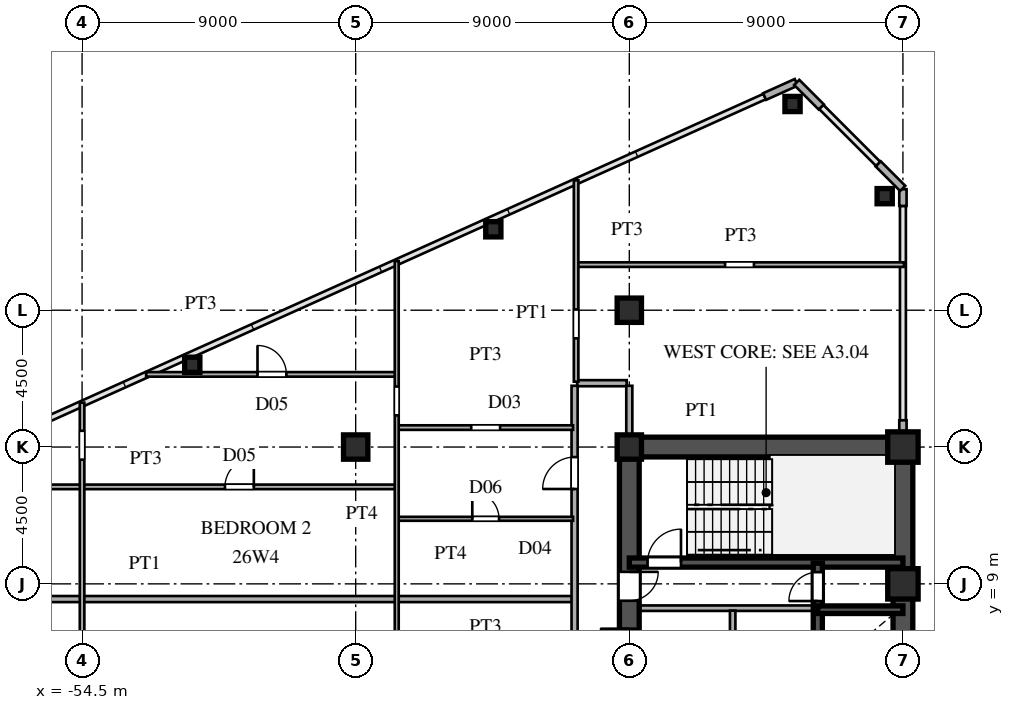
"""IFC4 building model, lengths in metres.
Left out: names, types, materials, properties, quantities, classifications, styles, units other than length and angle.
Written with IfcOpenShell. Run it as: python <this file> out.ifc"""

import sys

from ifc_helpers import new_model, si_unit, direction, frame, frame_2d, origin, origin_2d, place, context, subcontext, project, spatial, rectangle, hollow_rectangle, i_section, extrude, source, transform, mapped, element, fill, save


model = new_model("IFC4")
c1 = context("Model", 3, precision=1e-05, world=origin(), true_north=direction((0.0, 1.0)))
c2 = subcontext(c1, "Body", "Model", "MODEL_VIEW")
j1 = project(units=[si_unit("LENGTHUNIT", "METRE"), si_unit("PLANEANGLEUNIT", "RADIAN")], contexts=[c1])
p1 = place(None, origin())
s1 = spatial("IfcSite", under=j1, at=p1, CompositionType="ELEMENT")
p2 = place(p1, origin())
s2 = spatial("IfcBuilding", under=s1, at=p2, CompositionType="ELEMENT")
p3 = place(p2, frame((0.0, 0.0, 99.6)))
s3 = spatial("IfcBuildingStorey", under=s2, at=p3, CompositionType="ELEMENT", Elevation=99.6)
m1 = source(origin(), c2, "Body", "SweptSolid", [
    extrude(hollow_rectangle(XDim=1.0, YDim=1.0, WallThickness=0.042, at=origin_2d()), origin(), (0.0, 0.0, 1.0), 3.6),
])
for number, where, z_axis, x_axis in (
    (1, (-27.5, 9.0, 0.0), (0.0, 0.0, 1.0), (1.0, 0.0, 0.0)),
    (2, (-27.5, 13.5, 0.0), (0.0, 0.0, 1.0), (1.0, 0.0, 0.0)),
):
    element("IfcColumn", number, at=place(p3, frame(where, z_axis=z_axis, x_axis=x_axis)), inside=s3, PredefinedType="COLUMN", context=c2, shape_type="MappedRepresentation", body=[
        mapped(m1, transform((0.0, 0.0, 0.0), scale=1.0)),
    ])
m2 = source(origin(), c2, "Body", "SweptSolid", [
    extrude(i_section(OverallWidth=0.8, OverallDepth=0.8, WebThickness=0.032, FlangeThickness=0.05, at=origin_2d()), origin(), (0.0, 0.0, 1.0), 3.6),
])
for number, where, z_axis, x_axis in (
    (3, (-36.5, 13.5, 0.0), (0.0, 0.0, 1.0), (1.0, 0.0, 0.0)),
    (4, (-36.5, 18.0, 0.0), (0.0, 0.0, 1.0), (1.0, 0.0, 0.0)),
    (5, (-45.5, 13.5, 0.0), (0.0, 0.0, 1.0), (1.0, 0.0, 0.0)),
):
    element("IfcColumn", number, at=place(p3, frame(where, z_axis=z_axis, x_axis=x_axis)), inside=s3, PredefinedType="COLUMN", context=c2, shape_type="MappedRepresentation", body=[
        mapped(m2, transform((0.0, 0.0, 0.0), scale=1.0)),
    ])
m3 = source(origin(), c2, "Body", "SweptSolid", [
    extrude(hollow_rectangle(XDim=0.5, YDim=0.5, WallThickness=0.02, at=origin_2d()), origin(), (0.0, 0.0, 1.0), 3.6),
])
for number, where, z_axis, x_axis in (
    (6, (-28.1, 21.751, 0.0), (0.0, 0.0, 1.0), (1.0, 0.0, 0.0)),
    (7, (-31.131, 24.783, 0.0), (0.0, 0.0, 1.0), (1.0, 0.0, 0.0)),
    (8, (-40.973, 20.661, 0.0), (0.0, 0.0, 1.0), (1.0, 0.0, 0.0)),
    (9, (-50.875, 16.205, 0.0), (0.0, 0.0, 1.0), (1.0, 0.0, 0.0)),
):
    element("IfcColumn", number, at=place(p3, frame(where, z_axis=z_axis, x_axis=x_axis)), inside=s3, PredefinedType="COLUMN", context=c2, shape_type="MappedRepresentation", body=[
        mapped(m3, transform((0.0, 0.0, 0.0), scale=1.0)),
    ])
p4 = place(p3, frame((-27.5, 13.83, 0.0), z_axis=(0.0, 0.0, 1.0), x_axis=(0.0, 1.0, 0.0)))
e10 = element("IfcWall", 10, at=p4, inside=s3, PredefinedType="SOLIDWALL", context=c2, shape_type="SweptSolid", body=[
    extrude(rectangle(XDim=0.55, YDim=0.24, at=frame_2d((0.275, 0.0))), origin(), (0.0, 0.0, 1.0), 2.88),
])
p5 = place(p3, frame((-27.5, 21.43, 0.0), z_axis=(0.0, 0.0, 1.0), x_axis=(0.0, 1.0, 0.0)))
e11 = element("IfcWall", 11, at=p5, inside=s3, PredefinedType="SOLIDWALL", context=c2, shape_type="SweptSolid", body=[
    extrude(rectangle(XDim=0.55, YDim=0.24, at=frame_2d((0.275, 0.0))), origin(), (0.0, 0.0, 1.0), 3.38),
])
for number, where, z_axis, x_axis in (
    (12, (-27.507, 22.007, 0.0), (0.0, 0.0, 1.0), (-0.707, 0.707, 0.0)),
    (13, (-30.187, 24.687, 0.0), (0.0, 0.0, 1.0), (-0.707, 0.707, 0.0)),
):
    element("IfcWall", number, at=place(p3, frame(where, z_axis=z_axis, x_axis=x_axis)), inside=s3, PredefinedType="SOLIDWALL", context=c2, shape_type="SweptSolid", body=[
        extrude(rectangle(XDim=1.14, YDim=0.24, at=frame_2d((0.57, 0.0))), origin(), (0.0, 0.0, 1.0), 3.38),
    ])
p6 = place(p3, frame((-31.009, 25.496, 0.0), z_axis=(0.0, 0.0, 1.0), x_axis=(-0.911929519623, -0.410346866979, 0.0)))
e14 = element("IfcWall", 14, at=p6, inside=s3, PredefinedType="SOLIDWALL", context=c2, shape_type="SweptSolid", body=[
    extrude(rectangle(XDim=1.14, YDim=0.24, at=frame_2d((0.57, 0.0))), origin(), (0.0, 0.0, 1.0), 3.38),
])
p7 = place(p3, frame((-27.5, 1.3, 0.0), z_axis=(0.0, 0.0, 1.0), x_axis=(0.0, 1.0, 0.0)))
e15 = element("IfcWall", 15, at=p7, inside=s3, PredefinedType="SHEAR", context=c2, shape_type="SweptSolid", body=[
    extrude(rectangle(XDim=12.2, YDim=0.65, at=frame_2d((6.1, 0.0))), origin(), (0.0, 0.0, 1.0), 3.38),
])
p8 = place(p3, frame((-36.5, 13.5, 0.0), z_axis=(0.0, 0.0, 1.0), x_axis=(1.0, 0.0, 0.0)))
e16 = element("IfcWall", 16, at=p8, inside=s3, PredefinedType="SHEAR", context=c2, shape_type="SweptSolid", body=[
    extrude(rectangle(XDim=9.0, YDim=0.65, at=frame_2d((4.5, 0.0))), origin(), (0.0, 0.0, 1.0), 3.38),
])
p9 = place(p3, frame((-36.5, 8.2, 0.0), z_axis=(0.0, 0.0, 1.0), x_axis=(0.0, 1.0, 0.0)))
e17 = element("IfcWall", 17, at=p9, inside=s3, PredefinedType="SHEAR", context=c2, shape_type="SweptSolid", body=[
    extrude(rectangle(XDim=5.45, YDim=0.65, at=frame_2d((2.725, 0.0))), origin(), (0.0, 0.0, 1.0), 3.38),
])
p10 = place(p9, frame((0.245, 0.0, 0.0)))
e18 = element("IfcOpeningElement", 18, at=p10, cuts=e17, PredefinedType="OPENING", context=c2, shape_type="SweptSolid", body=[
    extrude(rectangle(XDim=0.95, YDim=2.15, at=frame_2d((0.475, 1.075))), frame((0.0, 0.335, 0.0), z_axis=(0.0, -1.0, 0.0), x_axis=(1.0, 0.0, 0.0)), (0.0, 0.0, 1.0), 0.67),
])
p11 = place(p3, frame((-36.5, 5.9, 0.0), z_axis=(0.0, 0.0, 1.0), x_axis=(0.0, 1.0, 0.0)))
e19 = element("IfcWall", 19, at=p11, inside=s3, PredefinedType="SHEAR", context=c2, shape_type="SweptSolid", body=[
    extrude(rectangle(XDim=2.3, YDim=0.65, at=frame_2d((1.15, 0.0))), origin(), (0.0, 0.0, 1.0), 3.38),
])
p12 = place(p11, frame((0.675, 0.0, 0.0)))
e20 = element("IfcOpeningElement", 20, at=p12, cuts=e19, PredefinedType="OPENING", context=c2, shape_type="SweptSolid", body=[
    extrude(rectangle(XDim=0.95, YDim=2.15, at=frame_2d((0.475, 1.075))), frame((0.0, 0.335, 0.0), z_axis=(0.0, -1.0, 0.0), x_axis=(1.0, 0.0, 0.0)), (0.0, 0.0, 1.0), 0.67),
])
p13 = place(p3, frame((-36.5, 9.7, 0.0), z_axis=(0.0, 0.0, 1.0), x_axis=(1.0, 0.0, 0.0)))
e21 = element("IfcWall", 21, at=p13, inside=s3, PredefinedType="SHEAR", context=c2, shape_type="SweptSolid", body=[
    extrude(rectangle(XDim=9.0, YDim=0.3, at=frame_2d((4.5, 0.0))), origin(), (0.0, 0.0, 1.0), 3.38),
])
p14 = place(p13, frame((0.6, 0.0, 0.0)))
e22 = element("IfcOpeningElement", 22, at=p14, cuts=e21, PredefinedType="OPENING", context=c2, shape_type="SweptSolid", body=[
    extrude(rectangle(XDim=1.1, YDim=2.2, at=frame_2d((0.55, 1.1))), frame((0.0, 0.16, 0.0), z_axis=(0.0, -1.0, 0.0), x_axis=(1.0, 0.0, 0.0)), (0.0, 0.0, 1.0), 0.32),
])
p15 = place(p3, frame((-30.3, 8.15, 0.0), z_axis=(0.0, 0.0, 1.0), x_axis=(1.0, 0.0, 0.0)))
e23 = element("IfcWall", 23, at=p15, inside=s3, PredefinedType="SHEAR", context=c2, shape_type="SweptSolid", body=[
    extrude(rectangle(XDim=2.8, YDim=0.25, at=frame_2d((1.4, 0.0))), origin(), (0.0, 0.0, 1.0), 3.38),
])
p16 = place(p3, frame((-30.3, 5.9, 0.0), z_axis=(0.0, 0.0, 1.0), x_axis=(0.0, 1.0, 0.0)))
e24 = element("IfcWall", 24, at=p16, inside=s3, PredefinedType="SHEAR", context=c2, shape_type="SweptSolid", body=[
    extrude(rectangle(XDim=2.25, YDim=0.3, at=frame_2d((1.125, 0.0))), origin(), (0.0, 0.0, 1.0), 3.38),
])
p17 = place(p3, frame((-30.3, 8.15, 0.0), z_axis=(0.0, 0.0, 1.0), x_axis=(0.0, 1.0, 0.0)))
e25 = element("IfcWall", 25, at=p17, inside=s3, PredefinedType="SHEAR", context=c2, shape_type="SweptSolid", body=[
    extrude(rectangle(XDim=1.53, YDim=0.3, at=frame_2d((0.765, 0.0))), origin(), (0.0, 0.0, 1.0), 3.38),
])
p18 = place(p17, frame((0.285, 0.0, 0.0)))
e26 = element("IfcOpeningElement", 26, at=p18, cuts=e25, PredefinedType="OPENING", context=c2, shape_type="SweptSolid", body=[
    extrude(rectangle(XDim=0.95, YDim=2.15, at=frame_2d((0.475, 1.075))), frame((0.0, 0.16, 0.0), z_axis=(0.0, -1.0, 0.0), x_axis=(1.0, 0.0, 0.0)), (0.0, 0.0, 1.0), 0.32),
])
p19 = place(p3, frame((-36.15, 8.2, 0.0), z_axis=(0.0, 0.0, 1.0), x_axis=(1.0, 0.0, 0.0)))
e27 = element("IfcWall", 27, at=p19, inside=s3, PredefinedType="PARTITIONING", context=c2, shape_type="SweptSolid", body=[
    extrude(rectangle(XDim=5.7, YDim=0.18, at=frame_2d((2.85, 0.0))), origin(), (0.0, 0.0, 1.0), 3.38),
])
p20 = place(p3, frame((-33.1, 1.38, 0.0), z_axis=(0.0, 0.0, 1.0), x_axis=(0.0, 1.0, 0.0)))
e28 = element("IfcWall", 28, at=p20, inside=s3, PredefinedType="PARTITIONING", context=c2, shape_type="SweptSolid", body=[
    extrude(rectangle(XDim=6.74, YDim=0.18, at=frame_2d((3.37, 0.0))), origin(), (0.0, 0.0, 1.0), 3.38),
])
p21 = place(p3, frame((-68.79, 8.5, 0.0), z_axis=(0.0, 0.0, 1.0), x_axis=(1.0, 0.0, 0.0)))
e29 = element("IfcWall", 29, at=p21, inside=s3, PredefinedType="PARTITIONING", context=c2, shape_type="SweptSolid", body=[
    extrude(rectangle(XDim=30.41, YDim=0.2, at=frame_2d((15.205, 0.0))), origin(), (0.0, 0.0, 1.0), 3.38),
])
p22 = place(p3, frame((-44.1, 11.14, 0.0), z_axis=(0.0, 0.0, 1.0), x_axis=(1.0, 0.0, 0.0)))
e30 = element("IfcWall", 30, at=p22, inside=s3, PredefinedType="PARTITIONING", context=c2, shape_type="SweptSolid", body=[
    extrude(rectangle(XDim=5.75, YDim=0.13, at=frame_2d((2.875, 0.0))), origin(), (0.0, 0.0, 1.0), 3.38),
])
p23 = place(p22, frame((2.435, 0.0, 0.0)))
e31 = element("IfcOpeningElement", 31, at=p23, cuts=e30, PredefinedType="OPENING", context=c2, shape_type="SweptSolid", body=[
    extrude(rectangle(XDim=0.88, YDim=2.1, at=frame_2d((0.44, 1.05))), frame((0.0, 0.075, 0.0), z_axis=(0.0, -1.0, 0.0), x_axis=(1.0, 0.0, 0.0)), (0.0, 0.0, 1.0), 0.15),
])
p24 = place(p3, frame((-60.603, 12.19, 0.0), z_axis=(0.0, 0.0, 1.0), x_axis=(1.0, 0.0, 0.0)))
e32 = element("IfcWall", 32, at=p24, inside=s3, PredefinedType="PARTITIONING", context=c2, shape_type="SweptSolid", body=[
    extrude(rectangle(XDim=16.403, YDim=0.15, at=frame_2d((8.202, 0.0))), origin(), (0.0, 0.0, 1.0), 3.38),
])
p25 = place(p24, frame((10.803, 0.0, 0.0)))
e33 = element("IfcOpeningElement", 33, at=p25, cuts=e32, PredefinedType="OPENING", context=c2, shape_type="SweptSolid", body=[
    extrude(rectangle(XDim=0.95, YDim=2.15, at=frame_2d((0.475, 1.075))), frame((0.0, 0.085, 0.0), z_axis=(0.0, -1.0, 0.0), x_axis=(1.0, 0.0, 0.0)), (0.0, 0.0, 1.0), 0.17),
])
p26 = place(p24, frame((2.594, 0.0, 0.0)))
e34 = element("IfcOpeningElement", 34, at=p26, cuts=e32, PredefinedType="OPENING", context=c2, shape_type="SweptSolid", body=[
    extrude(rectangle(XDim=0.95, YDim=2.15, at=frame_2d((0.475, 1.075))), frame((0.0, 0.085, 0.0), z_axis=(0.0, -1.0, 0.0), x_axis=(1.0, 0.0, 0.0)), (0.0, 0.0, 1.0), 0.17),
])
p27 = place(p3, frame((-44.1, 14.14, 0.0), z_axis=(0.0, 0.0, 1.0), x_axis=(1.0, 0.0, 0.0)))
e35 = element("IfcWall", 35, at=p27, inside=s3, PredefinedType="PARTITIONING", context=c2, shape_type="SweptSolid", body=[
    extrude(rectangle(XDim=5.75, YDim=0.15, at=frame_2d((2.875, 0.0))), origin(), (0.0, 0.0, 1.0), 3.38),
])
p28 = place(p27, frame((2.4, 0.0, 0.0)))
e36 = element("IfcOpeningElement", 36, at=p28, cuts=e35, PredefinedType="OPENING", context=c2, shape_type="SweptSolid", body=[
    extrude(rectangle(XDim=0.95, YDim=2.15, at=frame_2d((0.475, 1.075))), frame((0.0, 0.085, 0.0), z_axis=(0.0, -1.0, 0.0), x_axis=(1.0, 0.0, 0.0)), (0.0, 0.0, 1.0), 0.17),
])
p29 = place(p3, frame((-38.215, 15.6, 0.0), z_axis=(0.0, 0.0, 1.0), x_axis=(1.0, 0.0, 0.0)))
e37 = element("IfcWall", 37, at=p29, inside=s3, PredefinedType="PARTITIONING", context=c2, shape_type="SweptSolid", body=[
    extrude(rectangle(XDim=1.63, YDim=0.2, at=frame_2d((0.815, 0.0))), origin(), (0.0, 0.0, 1.0), 3.38),
])
p30 = place(p3, frame((-52.394, 15.89, 0.0), z_axis=(0.0, 0.0, 1.0), x_axis=(1.0, 0.0, 0.0)))
e38 = element("IfcWall", 38, at=p30, inside=s3, PredefinedType="PARTITIONING", context=c2, shape_type="SweptSolid", body=[
    extrude(rectangle(XDim=8.194, YDim=0.15, at=frame_2d((4.097, 0.0))), origin(), (0.0, 0.0, 1.0), 3.38),
])
p31 = place(p30, frame((3.664, 0.0, 0.0)))
e39 = element("IfcOpeningElement", 39, at=p31, cuts=e38, PredefinedType="OPENING", context=c2, shape_type="SweptSolid", body=[
    extrude(rectangle(XDim=0.95, YDim=2.15, at=frame_2d((0.475, 1.075))), frame((0.0, 0.085, 0.0), z_axis=(0.0, -1.0, 0.0), x_axis=(1.0, 0.0, 0.0)), (0.0, 0.0, 1.0), 0.17),
])
p32 = place(p3, frame((-38.2, 19.5, 0.0), z_axis=(0.0, 0.0, 1.0), x_axis=(1.0, 0.0, 0.0)))
e40 = element("IfcWall", 40, at=p32, inside=s3, PredefinedType="PARTITIONING", context=c2, shape_type="SweptSolid", body=[
    extrude(rectangle(XDim=10.735, YDim=0.15, at=frame_2d((5.367, 0.0))), origin(), (0.0, 0.0, 1.0), 3.38),
])
p33 = place(p32, frame((4.85, 0.0, 0.0)))
e41 = element("IfcOpeningElement", 41, at=p33, cuts=e40, PredefinedType="OPENING", context=c2, shape_type="SweptSolid", body=[
    extrude(rectangle(XDim=0.95, YDim=2.15, at=frame_2d((0.475, 1.075))), frame((0.0, 0.085, 0.0), z_axis=(0.0, -1.0, 0.0), x_axis=(1.0, 0.0, 0.0)), (0.0, 0.0, 1.0), 0.17),
])
p34 = place(p3, frame((-54.5, -12.75, 0.0), z_axis=(0.0, 0.0, 1.0), x_axis=(0.0, 1.0, 0.0)))
e42 = element("IfcWall", 42, at=p34, inside=s3, PredefinedType="PARTITIONING", context=c2, shape_type="SweptSolid", body=[
    extrude(rectangle(XDim=27.71, YDim=0.15, at=frame_2d((13.855, 0.0))), origin(), (0.0, 0.0, 1.0), 2.68),
])
p35 = place(p34, frame((4.625, 0.0, 0.0)))
e43 = element("IfcOpeningElement", 43, at=p35, cuts=e42, PredefinedType="OPENING", context=c2, shape_type="SweptSolid", body=[
    extrude(rectangle(XDim=0.95, YDim=2.15, at=frame_2d((0.475, 1.075))), frame((0.0, 0.085, 0.0), z_axis=(0.0, -1.0, 0.0), x_axis=(1.0, 0.0, 0.0)), (0.0, 0.0, 1.0), 0.17),
])
p36 = place(p34, frame((1.192, 0.0, 0.0)))
e44 = element("IfcOpeningElement", 44, at=p36, cuts=e42, PredefinedType="OPENING", context=c2, shape_type="SweptSolid", body=[
    extrude(rectangle(XDim=0.95, YDim=2.15, at=frame_2d((0.475, 1.075))), frame((0.0, 0.085, 0.0), z_axis=(0.0, -1.0, 0.0), x_axis=(1.0, 0.0, 0.0)), (0.0, 0.0, 1.0), 0.17),
])
p37 = place(p34, frame((8.717, 0.0, 0.0)))
e45 = element("IfcOpeningElement", 45, at=p37, cuts=e42, PredefinedType="OPENING", context=c2, shape_type="SweptSolid", body=[
    extrude(rectangle(XDim=0.95, YDim=2.15, at=frame_2d((0.475, 1.075))), frame((0.0, 0.085, 0.0), z_axis=(0.0, -1.0, 0.0), x_axis=(1.0, 0.0, 0.0)), (0.0, 0.0, 1.0), 0.17),
])
p38 = place(p34, frame((15.275, 0.0, 0.0)))
e46 = element("IfcOpeningElement", 46, at=p38, cuts=e42, PredefinedType="OPENING", context=c2, shape_type="SweptSolid", body=[
    extrude(rectangle(XDim=0.95, YDim=2.15, at=frame_2d((0.475, 1.075))), frame((0.0, 0.085, 0.0), z_axis=(0.0, -1.0, 0.0), x_axis=(1.0, 0.0, 0.0)), (0.0, 0.0, 1.0), 0.17),
])
p39 = place(p34, frame((25.835, 0.0, 0.0)))
e47 = element("IfcOpeningElement", 47, at=p39, cuts=e42, PredefinedType="OPENING", context=c2, shape_type="SweptSolid", body=[
    extrude(rectangle(XDim=0.95, YDim=2.15, at=frame_2d((0.475, 1.075))), frame((0.0, 0.085, 0.0), z_axis=(0.0, -1.0, 0.0), x_axis=(1.0, 0.0, 0.0)), (0.0, 0.0, 1.0), 0.17),
])
p40 = place(p3, frame((-44.15, 5.252, 0.0), z_axis=(0.0, 0.0, 1.0), x_axis=(0.0, 1.0, 0.0)))
e48 = element("IfcWall", 48, at=p40, inside=s3, PredefinedType="PARTITIONING", context=c2, shape_type="SweptSolid", body=[
    extrude(rectangle(XDim=14.365, YDim=0.13, at=frame_2d((7.183, 0.0))), origin(), (0.0, 0.0, 1.0), 3.38),
])
p41 = place(p40, frame((9.29, 0.0, 0.0)))
e49 = element("IfcOpeningElement", 49, at=p41, cuts=e48, PredefinedType="OPENING", context=c2, shape_type="SweptSolid", body=[
    extrude(rectangle(XDim=0.95, YDim=2.15, at=frame_2d((0.475, 1.075))), frame((0.0, 0.075, 0.0), z_axis=(0.0, -1.0, 0.0), x_axis=(1.0, 0.0, 0.0)), (0.0, 0.0, 1.0), 0.15),
])
p42 = place(p3, frame((-38.3, -15.515, 0.0), z_axis=(0.0, 0.0, 1.0), x_axis=(0.0, 1.0, 0.0)))
e50 = element("IfcWall", 50, at=p42, inside=s3, PredefinedType="PARTITIONING", context=c2, shape_type="SweptSolid", body=[
    extrude(rectangle(XDim=31.03, YDim=0.2, at=frame_2d((15.515, 0.0))), origin(), (0.0, 0.0, 1.0), 3.38),
])
p43 = place(p42, frame((0.79, 0.0, 0.0)))
e51 = element("IfcOpeningElement", 51, at=p43, cuts=e50, PredefinedType="OPENING", context=c2, shape_type="SweptSolid", body=[
    extrude(rectangle(XDim=1.05, YDim=2.25, at=frame_2d((0.525, 1.125))), frame((0.0, 0.11, 0.0), z_axis=(0.0, -1.0, 0.0), x_axis=(1.0, 0.0, 0.0)), (0.0, 0.0, 1.0), 0.22),
])
p44 = place(p42, frame((7.186, 0.0, 0.0)))
e52 = element("IfcOpeningElement", 52, at=p44, cuts=e50, PredefinedType="OPENING", context=c2, shape_type="SweptSolid", body=[
    extrude(rectangle(XDim=1.05, YDim=2.25, at=frame_2d((0.525, 1.125))), frame((0.0, 0.11, 0.0), z_axis=(0.0, -1.0, 0.0), x_axis=(1.0, 0.0, 0.0)), (0.0, 0.0, 1.0), 0.22),
])
p45 = place(p42, frame((17.825, 0.0, 0.0)))
e53 = element("IfcOpeningElement", 53, at=p45, cuts=e50, PredefinedType="OPENING", context=c2, shape_type="SweptSolid", body=[
    extrude(rectangle(XDim=1.05, YDim=2.25, at=frame_2d((0.525, 1.125))), frame((0.0, 0.11, 0.0), z_axis=(0.0, -1.0, 0.0), x_axis=(1.0, 0.0, 0.0)), (0.0, 0.0, 1.0), 0.22),
])
p46 = place(p42, frame((27.635, 0.0, 0.0)))
e54 = element("IfcOpeningElement", 54, at=p46, cuts=e50, PredefinedType="OPENING", context=c2, shape_type="SweptSolid", body=[
    extrude(rectangle(XDim=1.05, YDim=2.25, at=frame_2d((0.525, 1.125))), frame((0.0, 0.11, 0.0), z_axis=(0.0, -1.0, 0.0), x_axis=(1.0, 0.0, 0.0)), (0.0, 0.0, 1.0), 0.22),
])
p47 = place(p3, frame((-38.25, 15.65, 0.0), z_axis=(0.0, 0.0, 1.0), x_axis=(0.0, 1.0, 0.0)))
e55 = element("IfcWall", 55, at=p47, inside=s3, PredefinedType="PARTITIONING", context=c2, shape_type="SweptSolid", body=[
    extrude(rectangle(XDim=6.623, YDim=0.15, at=frame_2d((3.312, 0.0))), origin(), (0.0, 0.0, 1.0), 3.38),
])
p48 = place(p47, frame((1.425, 0.0, 0.0)))
e56 = element("IfcOpeningElement", 56, at=p48, cuts=e55, PredefinedType="OPENING", context=c2, shape_type="SweptSolid", body=[
    extrude(rectangle(XDim=0.95, YDim=2.15, at=frame_2d((0.475, 1.075))), frame((0.0, 0.085, 0.0), z_axis=(0.0, -1.0, 0.0), x_axis=(1.0, 0.0, 0.0)), (0.0, 0.0, 1.0), 0.17),
])
p49 = place(p3, frame((-36.5, 13.83, 0.0), z_axis=(0.0, 0.0, 1.0), x_axis=(0.0, 1.0, 0.0)))
e57 = element("IfcWall", 57, at=p49, inside=s3, PredefinedType="PARTITIONING", context=c2, shape_type="SweptSolid", body=[
    extrude(rectangle(XDim=1.685, YDim=0.2, at=frame_2d((0.842, 0.0))), origin(), (0.0, 0.0, 1.0), 2.68),
])
m4 = source(origin(), c2, "Body", "SweptSolid", [
    extrude(rectangle(XDim=0.95, YDim=2.15, at=frame_2d((0.475, 1.075))), frame((0.0, 0.025, 0.0), z_axis=(0.0, -1.0, 0.0), x_axis=(1.0, 0.0, 0.0)), (0.0, 0.0, 1.0), 0.05),
])
p50 = place(p10, frame((0.95, 0.0, 0.0), z_axis=(0.0, 0.0, 1.0), x_axis=(-1.0, 0.0, 0.0)))
e58 = element("IfcDoor", 58, at=p50, inside=s3, OperationType="SINGLE_SWING_RIGHT", PredefinedType="DOOR", context=c2, shape_type="MappedRepresentation", body=[
    mapped(m4, transform((0.0, 0.0, 0.0), scale=1.0)),
])
fill(e18, e58)
p51 = place(p12, origin())
e59 = element("IfcDoor", 59, at=p51, inside=s3, OperationType="SINGLE_SWING_RIGHT", PredefinedType="DOOR", context=c2, shape_type="MappedRepresentation", body=[
    mapped(m4, transform((0.0, 0.0, 0.0), scale=1.0)),
])
fill(e20, e59)
m5 = source(origin(), c2, "Body", "SweptSolid", [
    extrude(rectangle(XDim=1.1, YDim=2.2, at=frame_2d((0.55, 1.1))), frame((0.0, 0.025, 0.0), z_axis=(0.0, -1.0, 0.0), x_axis=(1.0, 0.0, 0.0)), (0.0, 0.0, 1.0), 0.05),
])
p52 = place(p14, origin())
e60 = element("IfcDoor", 60, at=p52, inside=s3, OperationType="SINGLE_SWING_RIGHT", PredefinedType="DOOR", context=c2, shape_type="MappedRepresentation", body=[
    mapped(m5, transform((0.0, 0.0, 0.0), scale=1.0)),
])
fill(e22, e60)
p53 = place(p18, origin())
e61 = element("IfcDoor", 61, at=p53, inside=s3, OperationType="SINGLE_SWING_LEFT", PredefinedType="DOOR", context=c2, shape_type="MappedRepresentation", body=[
    mapped(m4, transform((0.0, 0.0, 0.0), scale=1.0)),
])
fill(e26, e61)
m6 = source(origin(), c2, "Body", "SweptSolid", [
    extrude(rectangle(XDim=0.88, YDim=2.1, at=frame_2d((0.44, 1.05))), frame((0.0, 0.025, 0.0), z_axis=(0.0, -1.0, 0.0), x_axis=(1.0, 0.0, 0.0)), (0.0, 0.0, 1.0), 0.05),
])
p54 = place(p23, origin())
e62 = element("IfcDoor", 62, at=p54, inside=s3, OperationType="SINGLE_SWING_LEFT", PredefinedType="DOOR", context=c2, shape_type="MappedRepresentation", body=[
    mapped(m6, transform((0.0, 0.0, 0.0), scale=1.0)),
])
fill(e31, e62)
m7 = source(origin(), c2, "Body", "SweptSolid", [
    extrude(rectangle(XDim=0.95, YDim=2.15, at=frame_2d((0.475, 1.075))), frame((0.0, 0.025, 0.0), z_axis=(0.0, -1.0, 0.0), x_axis=(1.0, 0.0, 0.0)), (0.0, 0.0, 1.0), 0.05),
])
p55 = place(p25, origin())
e63 = element("IfcDoor", 63, at=p55, inside=s3, OperationType="SINGLE_SWING_RIGHT", PredefinedType="DOOR", context=c2, shape_type="MappedRepresentation", body=[
    mapped(m7, transform((0.0, 0.0, 0.0), scale=1.0)),
])
fill(e33, e63)
p56 = place(p31, origin())
e64 = element("IfcDoor", 64, at=p56, inside=s3, OperationType="SINGLE_SWING_LEFT", PredefinedType="DOOR", context=c2, shape_type="MappedRepresentation", body=[
    mapped(m7, transform((0.0, 0.0, 0.0), scale=1.0)),
])
fill(e39, e64)
m8 = source(origin(), c2, "Body", "SweptSolid", [
    extrude(rectangle(XDim=1.05, YDim=2.25, at=frame_2d((0.525, 1.125))), frame((0.0, 0.025, 0.0), z_axis=(0.0, -1.0, 0.0), x_axis=(1.0, 0.0, 0.0)), (0.0, 0.0, 1.0), 0.05),
])
p57 = place(p46, origin())
e65 = element("IfcDoor", 65, at=p57, inside=s3, OperationType="SINGLE_SWING_LEFT", PredefinedType="DOOR", context=c2, shape_type="MappedRepresentation", body=[
    mapped(m8, transform((0.0, 0.0, 0.0), scale=1.0)),
])
fill(e54, e65)
save(model, sys.argv[1])
